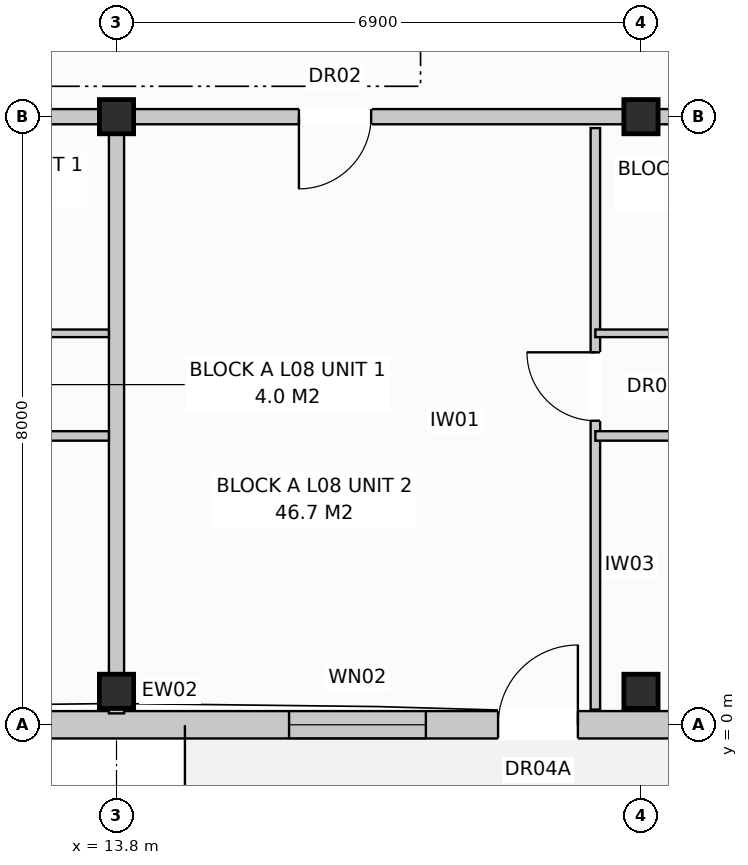
"""IFC4 building model, lengths in metres.
Left out: names, types, materials, properties, quantities, classifications, styles, units other than length and angle.
Written with IfcOpenShell. Run it as: python <this file> out.ifc"""

import sys

from ifc_helpers import new_model, si_unit, direction, frame, frame_2d, origin, origin_with_axes, origin_2d, place, context, subcontext, project, spatial, rectangle, extrude, element, fill, save


model = new_model("IFC4")
c1 = context("Model", 3, precision=1e-05, world=origin(), true_north=direction((0.0, 1.0)))
c2 = subcontext(c1, "Body", "Model", "MODEL_VIEW")
j1 = project(units=[si_unit("LENGTHUNIT", "METRE"), si_unit("PLANEANGLEUNIT", "RADIAN")], contexts=[c1])
p1 = place(None, origin())
s1 = spatial("IfcSite", under=j1, at=p1, CompositionType="ELEMENT")
p2 = place(p1, origin())
s2 = spatial("IfcBuilding", under=s1, at=p2, CompositionType="ELEMENT")
p3 = place(p2, frame((0.0, 0.0, 27.2)))
s3 = spatial("IfcBuildingStorey", under=s2, at=p3, CompositionType="ELEMENT", Elevation=27.2)
for number, where, z_axis, x_axis in (
    (1, (13.8, 0.44, 0.0), (0.0, 0.0, 1.0), (1.0, 0.0, 0.0)),
    (2, (13.8, 8.0, 0.0), (0.0, 0.0, 1.0), (1.0, 0.0, 0.0)),
    (3, (20.7, 0.44, 0.0), (0.0, 0.0, 1.0), (1.0, 0.0, 0.0)),
    (4, (20.7, 8.0, 0.0), (0.0, 0.0, 1.0), (1.0, 0.0, 0.0)),
):
    element("IfcColumn", number, at=place(p3, frame(where, z_axis=z_axis, x_axis=x_axis)), inside=s3, PredefinedType="COLUMN", context=c2, shape_type="SweptSolid", body=[
        extrude(rectangle(XDim=0.45, YDim=0.45, at=origin_2d()), origin(), (0.0, 0.0, 1.0), 3.2),
    ])
p4 = place(p3, frame((0.17, 0.0, 0.0), z_axis=(0.0, 0.0, 1.0), x_axis=(1.0, 0.0, 0.0)))
e5 = element("IfcWall", 5, at=p4, inside=s3, PredefinedType="STANDARD", context=c2, shape_type="SweptSolid", body=[
    extrude(rectangle(XDim=54.86, YDim=0.36, at=frame_2d((27.43, 0.0))), origin(), (0.0, 0.0, 1.0), 2.96),
])
p5 = place(p4, frame((3.75, 0.0, 0.0)))
e6 = element("IfcOpeningElement", 6, at=p5, cuts=e5, PredefinedType="OPENING", context=c2, shape_type="SweptSolid", body=[
    extrude(rectangle(XDim=1.05, YDim=2.12, at=frame_2d((0.525, 1.06))), frame((0.0, 0.192, 0.0), z_axis=(0.0, -1.0, 0.0), x_axis=(1.0, 0.0, 0.0)), (0.0, 0.0, 1.0), 0.384),
])
p6 = place(p4, frame((18.65, 0.0, 0.0)))
e7 = element("IfcOpeningElement", 7, at=p6, cuts=e5, PredefinedType="OPENING", context=c2, shape_type="SweptSolid", body=[
    extrude(rectangle(XDim=1.05, YDim=2.12, at=frame_2d((0.525, 1.06))), frame((0.0, 0.192, 0.0), z_axis=(0.0, -1.0, 0.0), x_axis=(1.0, 0.0, 0.0)), (0.0, 0.0, 1.0), 0.384),
])
p7 = place(p4, frame((29.05, 0.0, 0.0)))
e8 = element("IfcOpeningElement", 8, at=p7, cuts=e5, PredefinedType="OPENING", context=c2, shape_type="SweptSolid", body=[
    extrude(rectangle(XDim=1.05, YDim=2.12, at=frame_2d((0.525, 1.06))), frame((0.0, 0.192, 0.0), z_axis=(0.0, -1.0, 0.0), x_axis=(1.0, 0.0, 0.0)), (0.0, 0.0, 1.0), 0.384),
])
p8 = place(p4, frame((46.447, 0.0, 0.0)))
e9 = element("IfcOpeningElement", 9, at=p8, cuts=e5, PredefinedType="OPENING", context=c2, shape_type="SweptSolid", body=[
    extrude(rectangle(XDim=1.05, YDim=2.12, at=frame_2d((0.525, 1.06))), frame((0.0, 0.192, 0.0), z_axis=(0.0, -1.0, 0.0), x_axis=(1.0, 0.0, 0.0)), (0.0, 0.0, 1.0), 0.384),
])
p9 = place(p4, frame((1.6, 0.0, 0.8)))
e10 = element("IfcOpeningElement", 10, at=p9, cuts=e5, PredefinedType="OPENING", context=c2, shape_type="SweptSolid", body=[
    extrude(rectangle(XDim=1.8, YDim=1.7, at=frame_2d((0.9, 0.85))), frame((0.0, 0.192, 0.0), z_axis=(0.0, -1.0, 0.0), x_axis=(1.0, 0.0, 0.0)), (0.0, 0.0, 1.0), 0.384),
])
p10 = place(p4, frame((7.232, 0.0, 0.72)))
e11 = element("IfcOpeningElement", 11, at=p10, cuts=e5, PredefinedType="OPENING", context=c2, shape_type="SweptSolid", body=[
    extrude(rectangle(XDim=1.9, YDim=1.85, at=frame_2d((0.95, 0.925))), frame((0.0, 0.192, 0.0), z_axis=(0.0, -1.0, 0.0), x_axis=(1.0, 0.0, 0.0)), (0.0, 0.0, 1.0), 0.384),
])
p11 = place(p4, frame((10.85, 0.0, 0.72)))
e12 = element("IfcOpeningElement", 12, at=p11, cuts=e5, PredefinedType="OPENING", context=c2, shape_type="SweptSolid", body=[
    extrude(rectangle(XDim=1.1, YDim=1.5, at=frame_2d((0.55, 0.75))), frame((0.0, 0.192, 0.0), z_axis=(0.0, -1.0, 0.0), x_axis=(1.0, 0.0, 0.0)), (0.0, 0.0, 1.0), 0.384),
])
p12 = place(p4, frame((15.9, 0.0, 0.8)))
e13 = element("IfcOpeningElement", 13, at=p12, cuts=e5, PredefinedType="OPENING", context=c2, shape_type="SweptSolid", body=[
    extrude(rectangle(XDim=1.8, YDim=1.7, at=frame_2d((0.9, 0.85))), frame((0.0, 0.192, 0.0), z_axis=(0.0, -1.0, 0.0), x_axis=(1.0, 0.0, 0.0)), (0.0, 0.0, 1.0), 0.384),
])
p13 = place(p4, frame((21.55, 0.0, 0.72)))
e14 = element("IfcOpeningElement", 14, at=p13, cuts=e5, PredefinedType="OPENING", context=c2, shape_type="SweptSolid", body=[
    extrude(rectangle(XDim=1.9, YDim=1.85, at=frame_2d((0.95, 0.925))), frame((0.0, 0.192, 0.0), z_axis=(0.0, -1.0, 0.0), x_axis=(1.0, 0.0, 0.0)), (0.0, 0.0, 1.0), 0.384),
])
p14 = place(p4, frame((25.6, 0.0, 0.72)))
e15 = element("IfcOpeningElement", 15, at=p14, cuts=e5, PredefinedType="OPENING", context=c2, shape_type="SweptSolid", body=[
    extrude(rectangle(XDim=1.1, YDim=1.5, at=frame_2d((0.55, 0.75))), frame((0.0, 0.192, 0.0), z_axis=(0.0, -1.0, 0.0), x_axis=(1.0, 0.0, 0.0)), (0.0, 0.0, 1.0), 0.384),
])
p15 = place(p4, frame((31.4, 0.0, 0.8)))
e16 = element("IfcOpeningElement", 16, at=p15, cuts=e5, PredefinedType="OPENING", context=c2, shape_type="SweptSolid", body=[
    extrude(rectangle(XDim=1.8, YDim=1.7, at=frame_2d((0.9, 0.85))), frame((0.0, 0.192, 0.0), z_axis=(0.0, -1.0, 0.0), x_axis=(1.0, 0.0, 0.0)), (0.0, 0.0, 1.0), 0.384),
])
p16 = place(p4, frame((35.55, 0.0, 0.72)))
e17 = element("IfcOpeningElement", 17, at=p16, cuts=e5, PredefinedType="OPENING", context=c2, shape_type="SweptSolid", body=[
    extrude(rectangle(XDim=1.9, YDim=1.85, at=frame_2d((0.95, 0.925))), frame((0.0, 0.192, 0.0), z_axis=(0.0, -1.0, 0.0), x_axis=(1.0, 0.0, 0.0)), (0.0, 0.0, 1.0), 0.384),
])
p17 = place(p4, frame((39.25, 0.0, 0.72)))
e18 = element("IfcOpeningElement", 18, at=p17, cuts=e5, PredefinedType="OPENING", context=c2, shape_type="SweptSolid", body=[
    extrude(rectangle(XDim=1.1, YDim=1.5, at=frame_2d((0.55, 0.75))), frame((0.0, 0.192, 0.0), z_axis=(0.0, -1.0, 0.0), x_axis=(1.0, 0.0, 0.0)), (0.0, 0.0, 1.0), 0.384),
])
p18 = place(p4, frame((44.3, 0.0, 0.8)))
e19 = element("IfcOpeningElement", 19, at=p18, cuts=e5, PredefinedType="OPENING", context=c2, shape_type="SweptSolid", body=[
    extrude(rectangle(XDim=1.8, YDim=1.7, at=frame_2d((0.9, 0.85))), frame((0.0, 0.192, 0.0), z_axis=(0.0, -1.0, 0.0), x_axis=(1.0, 0.0, 0.0)), (0.0, 0.0, 1.0), 0.384),
])
p19 = place(p4, frame((49.55, 0.0, 0.72)))
e20 = element("IfcOpeningElement", 20, at=p19, cuts=e5, PredefinedType="OPENING", context=c2, shape_type="SweptSolid", body=[
    extrude(rectangle(XDim=1.1, YDim=1.5, at=frame_2d((0.55, 0.75))), frame((0.0, 0.192, 0.0), z_axis=(0.0, -1.0, 0.0), x_axis=(1.0, 0.0, 0.0)), (0.0, 0.0, 1.0), 0.384),
])
p20 = place(p4, frame((52.29, 0.0, 0.8)))
e21 = element("IfcOpeningElement", 21, at=p20, cuts=e5, PredefinedType="OPENING", context=c2, shape_type="SweptSolid", body=[
    extrude(rectangle(XDim=1.95, YDim=1.65, at=frame_2d((0.975, 0.825))), frame((0.0, 0.192, 0.0), z_axis=(0.0, -1.0, 0.0), x_axis=(1.0, 0.0, 0.0)), (0.0, 0.0, 1.0), 0.384),
])
p21 = place(p3, frame((13.8, 7.85, 0.0), z_axis=(0.0, 0.0, 1.0), x_axis=(0.0, -1.0, 0.0)))
e22 = element("IfcWall", 22, at=p21, inside=s3, PredefinedType="PARTITIONING", context=c2, shape_type="SweptSolid", body=[
    extrude(rectangle(XDim=7.7, YDim=0.2, at=frame_2d((3.85, 0.0))), origin(), (0.0, 0.0, 1.0), 2.96),
])
p22 = place(p3, frame((0.0, 8.0, 0.0), z_axis=(0.0, 0.0, 1.0), x_axis=(1.0, 0.0, 0.0)))
e23 = element("IfcWall", 23, at=p22, inside=s3, PredefinedType="PARTITIONING", context=c2, shape_type="SweptSolid", body=[
    extrude(rectangle(XDim=13.8, YDim=0.2, at=frame_2d((6.9, 0.0))), origin(), (0.0, 0.0, 1.0), 2.4),
])
p23 = place(p22, frame((2.4, 0.0, 0.0)))
e24 = element("IfcOpeningElement", 24, at=p23, cuts=e23, PredefinedType="OPENING", context=c2, shape_type="SweptSolid", body=[
    extrude(rectangle(XDim=0.95, YDim=2.15, at=frame_2d((0.475, 1.075))), frame((0.0, 0.112, 0.0), z_axis=(0.0, -1.0, 0.0), x_axis=(1.0, 0.0, 0.0)), (0.0, 0.0, 1.0), 0.224),
])
p24 = place(p3, frame((5.2, 5.15, 0.0), z_axis=(0.0, 0.0, 1.0), x_axis=(1.0, 0.0, 0.0)))
e25 = element("IfcWall", 25, at=p24, inside=s3, PredefinedType="PARTITIONING", context=c2, shape_type="SweptSolid", body=[
    extrude(rectangle(XDim=8.5, YDim=0.1, at=frame_2d((4.25, 0.0))), origin(), (0.0, 0.0, 1.0), 2.96),
])
p25 = place(p24, frame((1.0, 0.0, 0.0)))
e26 = element("IfcOpeningElement", 26, at=p25, cuts=e25, PredefinedType="OPENING", context=c2, shape_type="SweptSolid", body=[
    extrude(rectangle(XDim=0.85, YDim=2.1, at=frame_2d((0.425, 1.05))), frame((0.0, 0.062, 0.0), z_axis=(0.0, -1.0, 0.0), x_axis=(1.0, 0.0, 0.0)), (0.0, 0.0, 1.0), 0.124),
])
p26 = place(p24, frame((3.4, 0.0, 0.0)))
e27 = element("IfcOpeningElement", 27, at=p26, cuts=e25, PredefinedType="OPENING", context=c2, shape_type="SweptSolid", body=[
    extrude(rectangle(XDim=0.85, YDim=2.05, at=frame_2d((0.425, 1.025))), frame((0.0, 0.062, 0.0), z_axis=(0.0, -1.0, 0.0), x_axis=(1.0, 0.0, 0.0)), (0.0, 0.0, 1.0), 0.124),
])
p27 = place(p24, frame((6.2, 0.0, 0.0)))
e28 = element("IfcOpeningElement", 28, at=p27, cuts=e25, PredefinedType="OPENING", context=c2, shape_type="SweptSolid", body=[
    extrude(rectangle(XDim=0.85, YDim=2.05, at=frame_2d((0.425, 1.025))), frame((0.0, 0.062, 0.0), z_axis=(0.0, -1.0, 0.0), x_axis=(1.0, 0.0, 0.0)), (0.0, 0.0, 1.0), 0.124),
])
p28 = place(p3, frame((5.2, 3.8, 0.0), z_axis=(0.0, 0.0, 1.0), x_axis=(1.0, 0.0, 0.0)))
e29 = element("IfcWall", 29, at=p28, inside=s3, PredefinedType="PARTITIONING", context=c2, shape_type="SweptSolid", body=[
    extrude(rectangle(XDim=8.5, YDim=0.125, at=frame_2d((4.25, 0.0))), origin(), (0.0, 0.0, 1.0), 2.96),
])
p29 = place(p28, frame((1.5, 0.0, 0.0)))
e30 = element("IfcOpeningElement", 30, at=p29, cuts=e29, PredefinedType="OPENING", context=c2, shape_type="SweptSolid", body=[
    extrude(rectangle(XDim=0.9, YDim=2.1, at=frame_2d((0.45, 1.05))), frame((0.0, 0.074, 0.0), z_axis=(0.0, -1.0, 0.0), x_axis=(1.0, 0.0, 0.0)), (0.0, 0.0, 1.0), 0.149),
])
p30 = place(p28, frame((5.6, 0.0, 0.0)))
e31 = element("IfcOpeningElement", 31, at=p30, cuts=e29, PredefinedType="OPENING", context=c2, shape_type="SweptSolid", body=[
    extrude(rectangle(XDim=0.9, YDim=2.1, at=frame_2d((0.45, 1.05))), frame((0.0, 0.074, 0.0), z_axis=(0.0, -1.0, 0.0), x_axis=(1.0, 0.0, 0.0)), (0.0, 0.0, 1.0), 0.149),
])
p31 = place(p3, frame((13.8, 8.0, 0.0), z_axis=(0.0, 0.0, 1.0), x_axis=(1.0, 0.0, 0.0)))
e32 = element("IfcWall", 32, at=p31, inside=s3, PredefinedType="PARTITIONING", context=c2, shape_type="SweptSolid", body=[
    extrude(rectangle(XDim=20.7, YDim=0.2, at=frame_2d((10.35, 0.0))), origin(), (0.0, 0.0, 1.0), 2.4),
])
p32 = place(p31, frame((2.4, 0.0, 0.0)))
e33 = element("IfcOpeningElement", 33, at=p32, cuts=e32, PredefinedType="OPENING", context=c2, shape_type="SweptSolid", body=[
    extrude(rectangle(XDim=0.95, YDim=2.15, at=frame_2d((0.475, 1.075))), frame((0.0, 0.112, 0.0), z_axis=(0.0, -1.0, 0.0), x_axis=(1.0, 0.0, 0.0)), (0.0, 0.0, 1.0), 0.224),
])
p33 = place(p3, frame((20.1, 7.85, 0.0), z_axis=(0.0, 0.0, 1.0), x_axis=(0.0, -1.0, 0.0)))
e34 = element("IfcWall", 34, at=p33, inside=s3, PredefinedType="PARTITIONING", context=c2, shape_type="SweptSolid", body=[
    extrude(rectangle(XDim=7.65, YDim=0.125, at=frame_2d((3.825, 0.0))), origin(), (0.0, 0.0, 1.0), 2.96),
])
p34 = place(p33, frame((2.95, 0.0, 0.0)))
e35 = element("IfcOpeningElement", 35, at=p34, cuts=e34, PredefinedType="OPENING", context=c2, shape_type="SweptSolid", body=[
    extrude(rectangle(XDim=0.9, YDim=2.1, at=frame_2d((0.45, 1.05))), frame((0.0, 0.074, 0.0), z_axis=(0.0, -1.0, 0.0), x_axis=(1.0, 0.0, 0.0)), (0.0, 0.0, 1.0), 0.149),
])
p35 = place(p3, frame((20.1, 5.15, 0.0), z_axis=(0.0, 0.0, 1.0), x_axis=(1.0, 0.0, 0.0)))
e36 = element("IfcWall", 36, at=p35, inside=s3, PredefinedType="PARTITIONING", context=c2, shape_type="SweptSolid", body=[
    extrude(rectangle(XDim=14.3, YDim=0.1, at=frame_2d((7.15, 0.0))), origin(), (0.0, 0.0, 1.0), 2.96),
])
p36 = place(p35, frame((1.6, 0.0, 0.0)))
e37 = element("IfcOpeningElement", 37, at=p36, cuts=e36, PredefinedType="OPENING", context=c2, shape_type="SweptSolid", body=[
    extrude(rectangle(XDim=0.9, YDim=2.1, at=frame_2d((0.45, 1.05))), frame((0.0, 0.062, 0.0), z_axis=(0.0, -1.0, 0.0), x_axis=(1.0, 0.0, 0.0)), (0.0, 0.0, 1.0), 0.124),
])
p37 = place(p35, frame((5.1, 0.0, 0.0)))
e38 = element("IfcOpeningElement", 38, at=p37, cuts=e36, PredefinedType="OPENING", context=c2, shape_type="SweptSolid", body=[
    extrude(rectangle(XDim=0.85, YDim=2.05, at=frame_2d((0.425, 1.025))), frame((0.0, 0.062, 0.0), z_axis=(0.0, -1.0, 0.0), x_axis=(1.0, 0.0, 0.0)), (0.0, 0.0, 1.0), 0.124),
])
p38 = place(p35, frame((8.2, 0.0, 0.0)))
e39 = element("IfcOpeningElement", 39, at=p38, cuts=e36, PredefinedType="OPENING", context=c2, shape_type="SweptSolid", body=[
    extrude(rectangle(XDim=0.85, YDim=2.05, at=frame_2d((0.425, 1.025))), frame((0.0, 0.062, 0.0), z_axis=(0.0, -1.0, 0.0), x_axis=(1.0, 0.0, 0.0)), (0.0, 0.0, 1.0), 0.124),
])
p39 = place(p35, frame((11.6, 0.0, 0.0)))
e40 = element("IfcOpeningElement", 40, at=p39, cuts=e36, PredefinedType="OPENING", context=c2, shape_type="SweptSolid", body=[
    extrude(rectangle(XDim=0.85, YDim=2.05, at=frame_2d((0.425, 1.025))), frame((0.0, 0.062, 0.0), z_axis=(0.0, -1.0, 0.0), x_axis=(1.0, 0.0, 0.0)), (0.0, 0.0, 1.0), 0.124),
])
p40 = place(p3, frame((20.1, 3.8, 0.0), z_axis=(0.0, 0.0, 1.0), x_axis=(1.0, 0.0, 0.0)))
e41 = element("IfcWall", 41, at=p40, inside=s3, PredefinedType="PARTITIONING", context=c2, shape_type="SweptSolid", body=[
    extrude(rectangle(XDim=10.4, YDim=0.125, at=frame_2d((5.2, 0.0))), origin(), (0.0, 0.0, 1.0), 2.96),
])
p41 = place(p40, frame((2.0, 0.0, 0.0)))
e42 = element("IfcOpeningElement", 42, at=p41, cuts=e41, PredefinedType="OPENING", context=c2, shape_type="SweptSolid", body=[
    extrude(rectangle(XDim=0.9, YDim=2.1, at=frame_2d((0.45, 1.05))), frame((0.0, 0.074, 0.0), z_axis=(0.0, -1.0, 0.0), x_axis=(1.0, 0.0, 0.0)), (0.0, 0.0, 1.0), 0.149),
])
p42 = place(p40, frame((7.2, 0.0, 0.0)))
e43 = element("IfcOpeningElement", 43, at=p42, cuts=e41, PredefinedType="OPENING", context=c2, shape_type="SweptSolid", body=[
    extrude(rectangle(XDim=0.9, YDim=2.1, at=frame_2d((0.45, 1.05))), frame((0.0, 0.074, 0.0), z_axis=(0.0, -1.0, 0.0), x_axis=(1.0, 0.0, 0.0)), (0.0, 0.0, 1.0), 0.149),
])
p43 = place(p6, origin_with_axes())
e44 = element("IfcDoor", 44, at=p43, inside=s3, OperationType="SINGLE_SWING_RIGHT", PredefinedType="DOOR", context=c2, shape_type="SweptSolid", body=[
    extrude(rectangle(XDim=1.05, YDim=2.12, at=frame_2d((0.525, 1.06))), frame((0.0, 0.025, 0.0), z_axis=(0.0, -1.0, 0.0), x_axis=(1.0, 0.0, 0.0)), (0.0, 0.0, 1.0), 0.05),
])
fill(e7, e44)
p44 = place(p12, origin_with_axes())
e45 = element("IfcWindow", 45, at=p44, inside=s3, PartitioningType="SINGLE_PANEL", PredefinedType="WINDOW", context=c2, shape_type="SweptSolid", body=[
    extrude(rectangle(XDim=1.8, YDim=1.7, at=frame_2d((0.9, 0.85))), frame((0.0, 0.03, 0.0), z_axis=(0.0, -1.0, 0.0), x_axis=(1.0, 0.0, 0.0)), (0.0, 0.0, 1.0), 0.06),
])
fill(e13, e45)
p45 = place(p32, frame((0.95, 0.0, 0.0), z_axis=(0.0, 0.0, 1.0), x_axis=(-1.0, 0.0, 0.0)))
e46 = element("IfcDoor", 46, at=p45, inside=s3, OperationType="SINGLE_SWING_LEFT", PredefinedType="DOOR", context=c2, shape_type="SweptSolid", body=[
    extrude(rectangle(XDim=0.95, YDim=2.15, at=frame_2d((0.475, 1.075))), frame((0.0, 0.025, 0.0), z_axis=(0.0, -1.0, 0.0), x_axis=(1.0, 0.0, 0.0)), (0.0, 0.0, 1.0), 0.05),
])
fill(e33, e46)
p46 = place(p34, frame((0.9, 0.0, 0.0), z_axis=(0.0, 0.0, 1.0), x_axis=(-1.0, 0.0, 0.0)))
e47 = element("IfcDoor", 47, at=p46, inside=s3, OperationType="SINGLE_SWING_LEFT", PredefinedType="DOOR", context=c2, shape_type="SweptSolid", body=[
    extrude(rectangle(XDim=0.9, YDim=2.1, at=frame_2d((0.45, 1.05))), frame((0.0, 0.025, 0.0), z_axis=(0.0, -1.0, 0.0), x_axis=(1.0, 0.0, 0.0)), (0.0, 0.0, 1.0), 0.05),
])
fill(e35, e47)
save(model, sys.argv[1])
